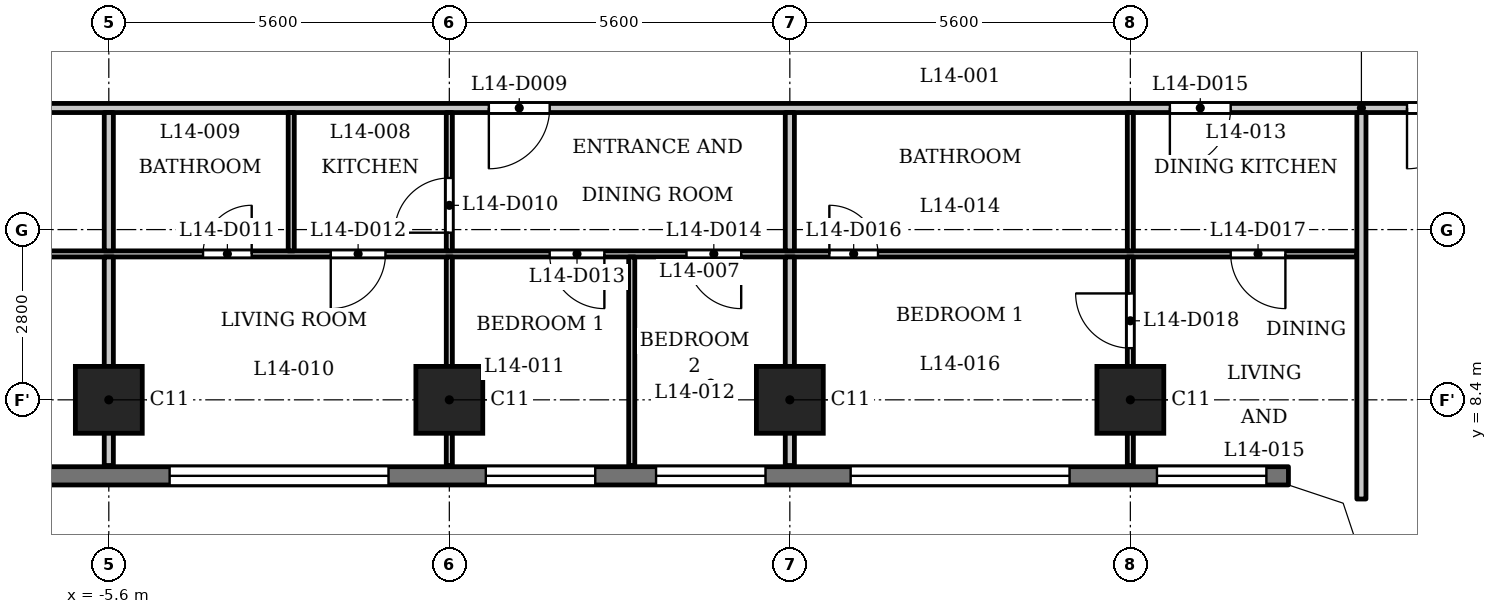
"""IFC4 building model, lengths in metres.
Left out: names, types, materials, properties, quantities, classifications, styles, units other than length and angle.
Written with IfcOpenShell. Run it as: python <this file> out.ifc"""

import sys

from ifc_helpers import new_model, si_unit, direction, frame, frame_2d, origin, origin_2d, place, context, subcontext, project, spatial, polyline, rectangle, outline, extrude, element, fill, save


model = new_model("IFC4")
c1 = context("Model", 3, precision=1e-05, world=origin(), true_north=direction((0.0, 1.0)))
c2 = subcontext(c1, "Body", "Model", "MODEL_VIEW")
j1 = project(units=[si_unit("LENGTHUNIT", "METRE"), si_unit("PLANEANGLEUNIT", "RADIAN")], contexts=[c1])
p1 = place(None, origin())
s1 = spatial("IfcSite", under=j1, at=p1, CompositionType="ELEMENT")
p2 = place(p1, origin())
s2 = spatial("IfcBuilding", under=s1, at=p2, CompositionType="ELEMENT")
p3 = place(p2, frame((0.0, 0.0, 58.5)))
s3 = spatial("IfcBuildingStorey", under=s2, at=p3, CompositionType="ELEMENT", Elevation=58.5)
for number, where, z_axis, x_axis in (
    (1, (-5.6, 8.4, 0.0), (0.0, 0.0, 1.0), (1.0, 0.0, 0.0)),
    (2, (0.0, 8.4, 0.0), (0.0, 0.0, 1.0), (1.0, 0.0, 0.0)),
    (3, (5.6, 8.4, 0.0), (0.0, 0.0, 1.0), (1.0, 0.0, 0.0)),
    (4, (11.2, 8.4, 0.0), (0.0, 0.0, 1.0), (1.0, 0.0, 0.0)),
):
    element("IfcColumn", number, at=place(p3, frame(where, z_axis=z_axis, x_axis=x_axis)), inside=s3, PredefinedType="COLUMN", context=c2, shape_type="SweptSolid", body=[
        extrude(rectangle(XDim=1.1, YDim=1.1, at=origin_2d()), origin(), (0.0, 0.0, 1.0), 3.5),
    ])
p4 = place(p3, frame((-13.8, 7.15, 0.0), z_axis=(0.0, 0.0, 1.0), x_axis=(1.0, 0.0, 0.0)))
e5 = element("IfcWall", 5, at=p4, inside=s3, PredefinedType="SOLIDWALL", context=c2, shape_type="SweptSolid", body=[
    extrude(rectangle(XDim=27.6, YDim=0.3, at=frame_2d((13.8, 0.0))), origin(), (0.0, 0.0, 1.0), 3.2),
])
p5 = place(p4, frame((0.363, 0.0, 0.9)))
e6 = element("IfcOpeningElement", 6, at=p5, cuts=e5, PredefinedType="OPENING", context=c2, shape_type="SweptSolid", body=[
    extrude(rectangle(XDim=1.8, YDim=1.25, at=frame_2d((0.9, 0.625))), frame((0.0, 0.16, 0.0), z_axis=(0.0, -1.0, 0.0), x_axis=(1.0, 0.0, 0.0)), (0.0, 0.0, 1.0), 0.32),
])
p6 = place(p4, frame((3.6, 0.0, 1.2)))
e7 = element("IfcOpeningElement", 7, at=p6, cuts=e5, PredefinedType="OPENING", context=c2, shape_type="SweptSolid", body=[
    extrude(rectangle(XDim=3.6, YDim=0.95, at=frame_2d((1.8, 0.475))), frame((0.0, 0.16, 0.0), z_axis=(0.0, -1.0, 0.0), x_axis=(1.0, 0.0, 0.0)), (0.0, 0.0, 1.0), 0.32),
])
p7 = place(p4, frame((9.2, 0.0, 1.2)))
e8 = element("IfcOpeningElement", 8, at=p7, cuts=e5, PredefinedType="OPENING", context=c2, shape_type="SweptSolid", body=[
    extrude(rectangle(XDim=3.6, YDim=0.95, at=frame_2d((1.8, 0.475))), frame((0.0, 0.16, 0.0), z_axis=(0.0, -1.0, 0.0), x_axis=(1.0, 0.0, 0.0)), (0.0, 0.0, 1.0), 0.32),
])
p8 = place(p4, frame((14.4, 0.0, 0.9)))
e9 = element("IfcOpeningElement", 9, at=p8, cuts=e5, PredefinedType="OPENING", context=c2, shape_type="SweptSolid", body=[
    extrude(rectangle(XDim=1.8, YDim=1.25, at=frame_2d((0.9, 0.625))), frame((0.0, 0.16, 0.0), z_axis=(0.0, -1.0, 0.0), x_axis=(1.0, 0.0, 0.0)), (0.0, 0.0, 1.0), 0.32),
])
p9 = place(p4, frame((17.2, 0.0, 0.9)))
e10 = element("IfcOpeningElement", 10, at=p9, cuts=e5, PredefinedType="OPENING", context=c2, shape_type="SweptSolid", body=[
    extrude(rectangle(XDim=1.8, YDim=1.25, at=frame_2d((0.9, 0.625))), frame((0.0, 0.16, 0.0), z_axis=(0.0, -1.0, 0.0), x_axis=(1.0, 0.0, 0.0)), (0.0, 0.0, 1.0), 0.32),
])
p10 = place(p4, frame((20.4, 0.0, 1.2)))
e11 = element("IfcOpeningElement", 11, at=p10, cuts=e5, PredefinedType="OPENING", context=c2, shape_type="SweptSolid", body=[
    extrude(rectangle(XDim=3.6, YDim=0.95, at=frame_2d((1.8, 0.475))), frame((0.0, 0.16, 0.0), z_axis=(0.0, -1.0, 0.0), x_axis=(1.0, 0.0, 0.0)), (0.0, 0.0, 1.0), 0.32),
])
p11 = place(p4, frame((25.438, 0.0, 0.9)))
e12 = element("IfcOpeningElement", 12, at=p11, cuts=e5, PredefinedType="OPENING", context=c2, shape_type="SweptSolid", body=[
    extrude(rectangle(XDim=1.8, YDim=1.25, at=frame_2d((0.9, 0.625))), frame((0.0, 0.16, 0.0), z_axis=(0.0, -1.0, 0.0), x_axis=(1.0, 0.0, 0.0)), (0.0, 0.0, 1.0), 0.32),
])
p12 = place(p3, frame((-14.925, 10.8, 0.0), z_axis=(0.0, 0.0, 1.0), x_axis=(1.0, 0.0, 0.0)))
e13 = element("IfcWall", 13, at=p12, inside=s3, PredefinedType="PARTITIONING", context=c2, shape_type="SweptSolid", body=[
    extrude(rectangle(XDim=29.85, YDim=0.1, at=frame_2d((14.925, 0.0))), origin(), (0.0, 0.0, 1.0), 3.2),
])
p13 = place(p12, frame((0.525, 0.0, 0.0)))
e14 = element("IfcOpeningElement", 14, at=p13, cuts=e13, PredefinedType="OPENING", context=c2, shape_type="SweptSolid", body=[
    extrude(rectangle(XDim=0.8, YDim=2.1, at=frame_2d((0.4, 1.05))), frame((0.0, 0.06, 0.0), z_axis=(0.0, -1.0, 0.0), x_axis=(1.0, 0.0, 0.0)), (0.0, 0.0, 1.0), 0.12),
])
p14 = place(p12, frame((5.375, 0.0, 0.0)))
e15 = element("IfcOpeningElement", 15, at=p14, cuts=e13, PredefinedType="OPENING", context=c2, shape_type="SweptSolid", body=[
    extrude(rectangle(XDim=0.9, YDim=2.1, at=frame_2d((0.45, 1.05))), frame((0.0, 0.06, 0.0), z_axis=(0.0, -1.0, 0.0), x_axis=(1.0, 0.0, 0.0)), (0.0, 0.0, 1.0), 0.12),
])
p15 = place(p12, frame((10.875, 0.0, 0.0)))
e16 = element("IfcOpeningElement", 16, at=p15, cuts=e13, PredefinedType="OPENING", context=c2, shape_type="SweptSolid", body=[
    extrude(rectangle(XDim=0.8, YDim=2.1, at=frame_2d((0.4, 1.05))), frame((0.0, 0.06, 0.0), z_axis=(0.0, -1.0, 0.0), x_axis=(1.0, 0.0, 0.0)), (0.0, 0.0, 1.0), 0.12),
])
p16 = place(p12, frame((12.975, 0.0, 0.0)))
e17 = element("IfcOpeningElement", 17, at=p16, cuts=e13, PredefinedType="OPENING", context=c2, shape_type="SweptSolid", body=[
    extrude(rectangle(XDim=0.9, YDim=2.1, at=frame_2d((0.45, 1.05))), frame((0.0, 0.06, 0.0), z_axis=(0.0, -1.0, 0.0), x_axis=(1.0, 0.0, 0.0)), (0.0, 0.0, 1.0), 0.12),
])
p17 = place(p12, frame((16.575, 0.0, 0.0)))
e18 = element("IfcOpeningElement", 18, at=p17, cuts=e13, PredefinedType="OPENING", context=c2, shape_type="SweptSolid", body=[
    extrude(rectangle(XDim=0.9, YDim=2.1, at=frame_2d((0.45, 1.05))), frame((0.0, 0.06, 0.0), z_axis=(0.0, -1.0, 0.0), x_axis=(1.0, 0.0, 0.0)), (0.0, 0.0, 1.0), 0.12),
])
p18 = place(p12, frame((18.825, 0.0, 0.0)))
e19 = element("IfcOpeningElement", 19, at=p18, cuts=e13, PredefinedType="OPENING", context=c2, shape_type="SweptSolid", body=[
    extrude(rectangle(XDim=0.9, YDim=2.1, at=frame_2d((0.45, 1.05))), frame((0.0, 0.06, 0.0), z_axis=(0.0, -1.0, 0.0), x_axis=(1.0, 0.0, 0.0)), (0.0, 0.0, 1.0), 0.12),
])
p19 = place(p12, frame((21.175, 0.0, 0.0)))
e20 = element("IfcOpeningElement", 20, at=p19, cuts=e13, PredefinedType="OPENING", context=c2, shape_type="SweptSolid", body=[
    extrude(rectangle(XDim=0.8, YDim=2.1, at=frame_2d((0.4, 1.05))), frame((0.0, 0.06, 0.0), z_axis=(0.0, -1.0, 0.0), x_axis=(1.0, 0.0, 0.0)), (0.0, 0.0, 1.0), 0.12),
])
p20 = place(p12, frame((27.775, 0.0, 0.0)))
e21 = element("IfcOpeningElement", 21, at=p20, cuts=e13, PredefinedType="OPENING", context=c2, shape_type="SweptSolid", body=[
    extrude(rectangle(XDim=0.9, YDim=2.1, at=frame_2d((0.45, 1.05))), frame((0.0, 0.06, 0.0), z_axis=(0.0, -1.0, 0.0), x_axis=(1.0, 0.0, 0.0)), (0.0, 0.0, 1.0), 0.12),
])
p21 = place(p3, frame((-17.4, 13.2, 0.0), z_axis=(0.0, 0.0, 1.0), x_axis=(1.0, 0.0, 0.0)))
e22 = element("IfcWall", 22, at=p21, inside=s3, PredefinedType="PARTITIONING", context=c2, shape_type="SweptSolid", body=[
    extrude(rectangle(XDim=34.8, YDim=0.15, at=frame_2d((17.4, 0.0))), origin(), (0.0, 0.0, 1.0), 3.2),
])
p22 = place(p21, frame((0.75, 0.0, 0.0)))
e23 = element("IfcOpeningElement", 23, at=p22, cuts=e22, PredefinedType="OPENING", context=c2, shape_type="SweptSolid", body=[
    extrude(rectangle(XDim=1.0, YDim=2.1, at=frame_2d((0.5, 1.05))), frame((0.0, 0.085, 0.0), z_axis=(0.0, -1.0, 0.0), x_axis=(1.0, 0.0, 0.0)), (0.0, 0.0, 1.0), 0.17),
])
p23 = place(p21, frame((33.15, 0.0, 0.0)))
e24 = element("IfcOpeningElement", 24, at=p23, cuts=e22, PredefinedType="OPENING", context=c2, shape_type="SweptSolid", body=[
    extrude(rectangle(XDim=1.0, YDim=2.1, at=frame_2d((0.5, 1.05))), frame((0.0, 0.085, 0.0), z_axis=(0.0, -1.0, 0.0), x_axis=(1.0, 0.0, 0.0)), (0.0, 0.0, 1.0), 0.17),
])
p24 = place(p21, frame((6.85, 0.0, 0.0)))
e25 = element("IfcOpeningElement", 25, at=p24, cuts=e22, PredefinedType="OPENING", context=c2, shape_type="SweptSolid", body=[
    extrude(rectangle(XDim=1.0, YDim=2.1, at=frame_2d((0.5, 1.05))), frame((0.0, 0.085, 0.0), z_axis=(0.0, -1.0, 0.0), x_axis=(1.0, 0.0, 0.0)), (0.0, 0.0, 1.0), 0.17),
])
p25 = place(p21, frame((18.05, 0.0, 0.0)))
e26 = element("IfcOpeningElement", 26, at=p25, cuts=e22, PredefinedType="OPENING", context=c2, shape_type="SweptSolid", body=[
    extrude(rectangle(XDim=1.0, YDim=2.1, at=frame_2d((0.5, 1.05))), frame((0.0, 0.085, 0.0), z_axis=(0.0, -1.0, 0.0), x_axis=(1.0, 0.0, 0.0)), (0.0, 0.0, 1.0), 0.17),
])
p26 = place(p21, frame((29.25, 0.0, 0.0)))
e27 = element("IfcOpeningElement", 27, at=p26, cuts=e22, PredefinedType="OPENING", context=c2, shape_type="SweptSolid", body=[
    extrude(rectangle(XDim=1.0, YDim=2.1, at=frame_2d((0.5, 1.05))), frame((0.0, 0.085, 0.0), z_axis=(0.0, -1.0, 0.0), x_axis=(1.0, 0.0, 0.0)), (0.0, 0.0, 1.0), 0.17),
])
p27 = place(p3, frame((-5.6, 7.32, 0.0), z_axis=(0.0, 0.0, 1.0), x_axis=(0.0, 1.0, 0.0)))
e28 = element("IfcWall", 28, at=p27, inside=s3, PredefinedType="PARTITIONING", context=c2, shape_type="SweptSolid", body=[
    extrude(rectangle(XDim=3.43, YDim=0.15, at=frame_2d((1.715, 0.0))), origin(), (0.0, 0.0, 1.0), 3.2),
])
p28 = place(p3, frame((-5.6, 10.85, 0.0), z_axis=(0.0, 0.0, 1.0), x_axis=(0.0, 1.0, 0.0)))
e29 = element("IfcWall", 29, at=p28, inside=s3, PredefinedType="PARTITIONING", context=c2, shape_type="SweptSolid", body=[
    extrude(rectangle(XDim=2.275, YDim=0.15, at=frame_2d((1.137, 0.0))), origin(), (0.0, 0.0, 1.0), 3.2),
])
p29 = place(p3, frame((-2.6, 10.85, 0.0), z_axis=(0.0, 0.0, 1.0), x_axis=(0.0, 1.0, 0.0)))
e30 = element("IfcWall", 30, at=p29, inside=s3, PredefinedType="PARTITIONING", context=c2, shape_type="SweptSolid", body=[
    extrude(rectangle(XDim=2.275, YDim=0.1, at=frame_2d((1.137, 0.0))), origin(), (0.0, 0.0, 1.0), 3.2),
])
p30 = place(p3, frame((0.0, 7.32, 0.0), z_axis=(0.0, 0.0, 1.0), x_axis=(0.0, 1.0, 0.0)))
e31 = element("IfcWall", 31, at=p30, inside=s3, PredefinedType="PARTITIONING", context=c2, shape_type="SweptSolid", body=[
    extrude(rectangle(XDim=3.43, YDim=0.1, at=frame_2d((1.715, 0.0))), origin(), (0.0, 0.0, 1.0), 3.2),
])
p31 = place(p3, frame((0.0, 10.85, 0.0), z_axis=(0.0, 0.0, 1.0), x_axis=(0.0, 1.0, 0.0)))
e32 = element("IfcWall", 32, at=p31, inside=s3, PredefinedType="PARTITIONING", context=c2, shape_type="SweptSolid", body=[
    extrude(rectangle(XDim=2.275, YDim=0.1, at=frame_2d((1.137, 0.0))), origin(), (0.0, 0.0, 1.0), 3.2),
])
p32 = place(p31, frame((0.299, 0.0, 0.0)))
e33 = element("IfcOpeningElement", 33, at=p32, cuts=e32, PredefinedType="OPENING", context=c2, shape_type="SweptSolid", body=[
    extrude(rectangle(XDim=0.9, YDim=2.1, at=frame_2d((0.45, 1.05))), frame((0.0, 0.06, 0.0), z_axis=(0.0, -1.0, 0.0), x_axis=(1.0, 0.0, 0.0)), (0.0, 0.0, 1.0), 0.12),
])
p33 = place(p3, frame((3.0, 7.32, 0.0), z_axis=(0.0, 0.0, 1.0), x_axis=(0.0, 1.0, 0.0)))
e34 = element("IfcWall", 34, at=p33, inside=s3, PredefinedType="PARTITIONING", context=c2, shape_type="SweptSolid", body=[
    extrude(rectangle(XDim=3.43, YDim=0.1, at=frame_2d((1.715, 0.0))), origin(), (0.0, 0.0, 1.0), 3.2),
])
p34 = place(p3, frame((5.6, 7.32, 0.0), z_axis=(0.0, 0.0, 1.0), x_axis=(0.0, 1.0, 0.0)))
e35 = element("IfcWall", 35, at=p34, inside=s3, PredefinedType="PARTITIONING", context=c2, shape_type="SweptSolid", body=[
    extrude(rectangle(XDim=3.43, YDim=0.15, at=frame_2d((1.715, 0.0))), origin(), (0.0, 0.0, 1.0), 3.2),
])
p35 = place(p3, frame((5.6, 10.85, 0.0), z_axis=(0.0, 0.0, 1.0), x_axis=(0.0, 1.0, 0.0)))
e36 = element("IfcWall", 36, at=p35, inside=s3, PredefinedType="PARTITIONING", context=c2, shape_type="SweptSolid", body=[
    extrude(rectangle(XDim=2.275, YDim=0.15, at=frame_2d((1.137, 0.0))), origin(), (0.0, 0.0, 1.0), 3.2),
])
p36 = place(p3, frame((11.2, 7.32, 0.0), z_axis=(0.0, 0.0, 1.0), x_axis=(0.0, 1.0, 0.0)))
e37 = element("IfcWall", 37, at=p36, inside=s3, PredefinedType="PARTITIONING", context=c2, shape_type="SweptSolid", body=[
    extrude(rectangle(XDim=3.43, YDim=0.1, at=frame_2d((1.715, 0.0))), origin(), (0.0, 0.0, 1.0), 3.2),
])
p37 = place(p36, frame((1.93, 0.0, 0.0)))
e38 = element("IfcOpeningElement", 38, at=p37, cuts=e37, PredefinedType="OPENING", context=c2, shape_type="SweptSolid", body=[
    extrude(rectangle(XDim=0.9, YDim=2.1, at=frame_2d((0.45, 1.05))), frame((0.0, 0.06, 0.0), z_axis=(0.0, -1.0, 0.0), x_axis=(1.0, 0.0, 0.0)), (0.0, 0.0, 1.0), 0.12),
])
p38 = place(p3, frame((11.2, 10.85, 0.0), z_axis=(0.0, 0.0, 1.0), x_axis=(0.0, 1.0, 0.0)))
e39 = element("IfcWall", 39, at=p38, inside=s3, PredefinedType="PARTITIONING", context=c2, shape_type="SweptSolid", body=[
    extrude(rectangle(XDim=2.275, YDim=0.1, at=frame_2d((1.137, 0.0))), origin(), (0.0, 0.0, 1.0), 3.2),
])
p39 = place(p3, frame((15.0, 6.769, 0.0), z_axis=(0.0, 0.0, 1.0), x_axis=(0.0, 1.0, 0.0)))
e40 = element("IfcWall", 40, at=p39, inside=s3, PredefinedType="PARTITIONING", context=c2, shape_type="SweptSolid", body=[
    extrude(rectangle(XDim=6.356, YDim=0.15, at=frame_2d((3.178, 0.0))), origin(), (0.0, 0.0, 1.0), 3.2),
])
p40 = place(p3, origin())
e41 = element("IfcWall", 41, at=p40, inside=s3, PredefinedType="SOLIDWALL", context=c2, shape_type="SweptSolid", body=[
    extrude(outline(polyline([(14.937, 6.937), (13.849, 7.3), (13.8, 7.3), (13.8, 7.0), (14.7, 6.7), (15.0, 5.8), (15.3, 5.8), (15.3, 5.849), (14.937, 6.937)])), origin(), (0.0, 0.0, 1.0), 3.2),
])
p41 = place(p23, origin())
e42 = element("IfcDoor", 42, at=p41, inside=s3, OperationType="SINGLE_SWING_LEFT", PredefinedType="DOOR", context=c2, shape_type="SweptSolid", body=[
    extrude(rectangle(XDim=1.0, YDim=2.1, at=frame_2d((0.5, 1.05))), frame((0.0, 0.025, 0.0), z_axis=(0.0, -1.0, 0.0), x_axis=(1.0, 0.0, 0.0)), (0.0, 0.0, 1.0), 0.05),
])
fill(e24, e42)
p42 = place(p25, origin())
e43 = element("IfcDoor", 43, at=p42, inside=s3, OperationType="SINGLE_SWING_LEFT", PredefinedType="DOOR", context=c2, shape_type="SweptSolid", body=[
    extrude(rectangle(XDim=1.0, YDim=2.1, at=frame_2d((0.5, 1.05))), frame((0.0, 0.025, 0.0), z_axis=(0.0, -1.0, 0.0), x_axis=(1.0, 0.0, 0.0)), (0.0, 0.0, 1.0), 0.05),
])
fill(e26, e43)
p43 = place(p32, origin())
e44 = element("IfcDoor", 44, at=p43, inside=s3, OperationType="SINGLE_SWING_RIGHT", PredefinedType="DOOR", context=c2, shape_type="SweptSolid", body=[
    extrude(rectangle(XDim=0.9, YDim=2.1, at=frame_2d((0.45, 1.05))), frame((0.0, 0.025, 0.0), z_axis=(0.0, -1.0, 0.0), x_axis=(1.0, 0.0, 0.0)), (0.0, 0.0, 1.0), 0.05),
])
fill(e33, e44)
p44 = place(p15, origin())
e45 = element("IfcDoor", 45, at=p44, inside=s3, OperationType="SINGLE_SWING_LEFT", PredefinedType="DOOR", context=c2, shape_type="SweptSolid", body=[
    extrude(rectangle(XDim=0.8, YDim=2.1, at=frame_2d((0.4, 1.05))), frame((0.0, 0.025, 0.0), z_axis=(0.0, -1.0, 0.0), x_axis=(1.0, 0.0, 0.0)), (0.0, 0.0, 1.0), 0.05),
])
fill(e16, e45)
p45 = place(p16, origin())
e46 = element("IfcDoor", 46, at=p45, inside=s3, OperationType="SINGLE_SWING_LEFT", PredefinedType="DOOR", context=c2, shape_type="SweptSolid", body=[
    extrude(rectangle(XDim=0.9, YDim=2.1, at=frame_2d((0.45, 1.05))), frame((0.0, 0.025, 0.0), z_axis=(0.0, -1.0, 0.0), x_axis=(1.0, 0.0, 0.0)), (0.0, 0.0, 1.0), 0.05),
])
fill(e17, e46)
p46 = place(p17, origin())
e47 = element("IfcDoor", 47, at=p46, inside=s3, OperationType="SINGLE_SWING_RIGHT", PredefinedType="DOOR", context=c2, shape_type="SweptSolid", body=[
    extrude(rectangle(XDim=0.9, YDim=2.1, at=frame_2d((0.45, 1.05))), frame((0.0, 0.025, 0.0), z_axis=(0.0, -1.0, 0.0), x_axis=(1.0, 0.0, 0.0)), (0.0, 0.0, 1.0), 0.05),
])
fill(e18, e47)
p47 = place(p18, origin())
e48 = element("IfcDoor", 48, at=p47, inside=s3, OperationType="SINGLE_SWING_RIGHT", PredefinedType="DOOR", context=c2, shape_type="SweptSolid", body=[
    extrude(rectangle(XDim=0.9, YDim=2.1, at=frame_2d((0.45, 1.05))), frame((0.0, 0.025, 0.0), z_axis=(0.0, -1.0, 0.0), x_axis=(1.0, 0.0, 0.0)), (0.0, 0.0, 1.0), 0.05),
])
fill(e19, e48)
p48 = place(p26, origin())
e49 = element("IfcDoor", 49, at=p48, inside=s3, OperationType="SINGLE_SWING_LEFT", PredefinedType="DOOR", context=c2, shape_type="SweptSolid", body=[
    extrude(rectangle(XDim=1.0, YDim=2.1, at=frame_2d((0.5, 1.05))), frame((0.0, 0.025, 0.0), z_axis=(0.0, -1.0, 0.0), x_axis=(1.0, 0.0, 0.0)), (0.0, 0.0, 1.0), 0.05),
])
fill(e27, e49)
p49 = place(p19, origin())
e50 = element("IfcDoor", 50, at=p49, inside=s3, OperationType="SINGLE_SWING_RIGHT", PredefinedType="DOOR", context=c2, shape_type="SweptSolid", body=[
    extrude(rectangle(XDim=0.8, YDim=2.1, at=frame_2d((0.4, 1.05))), frame((0.0, 0.025, 0.0), z_axis=(0.0, -1.0, 0.0), x_axis=(1.0, 0.0, 0.0)), (0.0, 0.0, 1.0), 0.05),
])
fill(e20, e50)
p50 = place(p20, origin())
e51 = element("IfcDoor", 51, at=p50, inside=s3, OperationType="SINGLE_SWING_RIGHT", PredefinedType="DOOR", context=c2, shape_type="SweptSolid", body=[
    extrude(rectangle(XDim=0.9, YDim=2.1, at=frame_2d((0.45, 1.05))), frame((0.0, 0.025, 0.0), z_axis=(0.0, -1.0, 0.0), x_axis=(1.0, 0.0, 0.0)), (0.0, 0.0, 1.0), 0.05),
])
fill(e21, e51)
p51 = place(p37, origin())
e52 = element("IfcDoor", 52, at=p51, inside=s3, OperationType="SINGLE_SWING_LEFT", PredefinedType="DOOR", context=c2, shape_type="SweptSolid", body=[
    extrude(rectangle(XDim=0.9, YDim=2.1, at=frame_2d((0.45, 1.05))), frame((0.0, 0.025, 0.0), z_axis=(0.0, -1.0, 0.0), x_axis=(1.0, 0.0, 0.0)), (0.0, 0.0, 1.0), 0.05),
])
fill(e38, e52)
p52 = place(p7, origin())
e53 = element("IfcWindow", 53, at=p52, inside=s3, PartitioningType="SINGLE_PANEL", PredefinedType="WINDOW", context=c2, shape_type="SweptSolid", body=[
    extrude(rectangle(XDim=3.6, YDim=0.95, at=frame_2d((1.8, 0.475))), frame((0.0, 0.03, 0.0), z_axis=(0.0, -1.0, 0.0), x_axis=(1.0, 0.0, 0.0)), (0.0, 0.0, 1.0), 0.06),
])
fill(e8, e53)
p53 = place(p8, origin())
e54 = element("IfcWindow", 54, at=p53, inside=s3, PartitioningType="SINGLE_PANEL", PredefinedType="WINDOW", context=c2, shape_type="SweptSolid", body=[
    extrude(rectangle(XDim=1.8, YDim=1.25, at=frame_2d((0.9, 0.625))), frame((0.0, 0.03, 0.0), z_axis=(0.0, -1.0, 0.0), x_axis=(1.0, 0.0, 0.0)), (0.0, 0.0, 1.0), 0.06),
])
fill(e9, e54)
p54 = place(p9, origin())
e55 = element("IfcWindow", 55, at=p54, inside=s3, PartitioningType="SINGLE_PANEL", PredefinedType="WINDOW", context=c2, shape_type="SweptSolid", body=[
    extrude(rectangle(XDim=1.8, YDim=1.25, at=frame_2d((0.9, 0.625))), frame((0.0, 0.03, 0.0), z_axis=(0.0, -1.0, 0.0), x_axis=(1.0, 0.0, 0.0)), (0.0, 0.0, 1.0), 0.06),
])
fill(e10, e55)
p55 = place(p10, origin())
e56 = element("IfcWindow", 56, at=p55, inside=s3, PartitioningType="SINGLE_PANEL", PredefinedType="WINDOW", context=c2, shape_type="SweptSolid", body=[
    extrude(rectangle(XDim=3.6, YDim=0.95, at=frame_2d((1.8, 0.475))), frame((0.0, 0.03, 0.0), z_axis=(0.0, -1.0, 0.0), x_axis=(1.0, 0.0, 0.0)), (0.0, 0.0, 1.0), 0.06),
])
fill(e11, e56)
p56 = place(p11, origin())
e57 = element("IfcWindow", 57, at=p56, inside=s3, PartitioningType="SINGLE_PANEL", PredefinedType="WINDOW", context=c2, shape_type="SweptSolid", body=[
    extrude(rectangle(XDim=1.8, YDim=1.25, at=frame_2d((0.9, 0.625))), frame((0.0, 0.03, 0.0), z_axis=(0.0, -1.0, 0.0), x_axis=(1.0, 0.0, 0.0)), (0.0, 0.0, 1.0), 0.06),
])
fill(e12, e57)
save(model, sys.argv[1])
